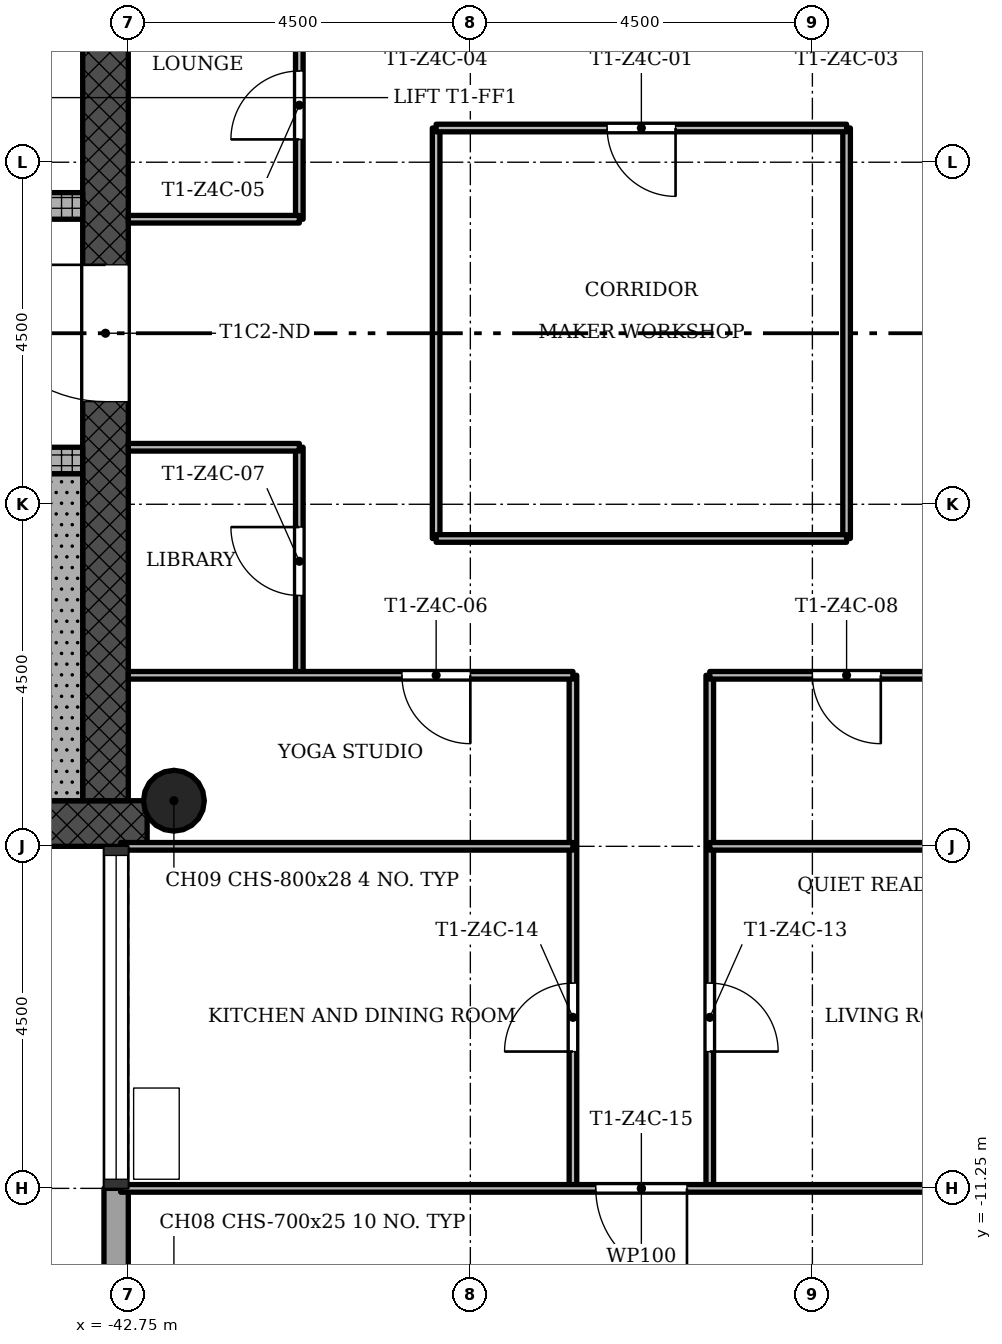
"""IFC4 building model, lengths in metres.
Left out: names, types, materials, properties, quantities, classifications, styles, units other than length and angle.
Written with IfcOpenShell. Run it as: python <this file> out.ifc"""

import sys

from ifc_helpers import new_model, si_unit, direction, frame, frame_2d, origin, origin_2d, place, context, subcontext, project, spatial, rectangle, hollow_circle, extrude, element, fill, save


model = new_model("IFC4")
c1 = context("Model", 3, precision=1e-05, world=origin(), true_north=direction((0.0, 1.0)))
c2 = subcontext(c1, "Body", "Model", "MODEL_VIEW")
j1 = project(units=[si_unit("LENGTHUNIT", "METRE"), si_unit("PLANEANGLEUNIT", "RADIAN")], contexts=[c1])
p1 = place(None, origin())
s1 = spatial("IfcSite", under=j1, at=p1, CompositionType="ELEMENT")
p2 = place(p1, origin())
s2 = spatial("IfcBuilding", under=s1, at=p2, CompositionType="ELEMENT")
p3 = place(p2, frame((0.0, 0.0, 185.8)))
s3 = spatial("IfcBuildingStorey", under=s2, at=p3, CompositionType="ELEMENT", Elevation=185.8)
p4 = place(p3, frame((-51.15, -6.45, 0.0), z_axis=(0.0, 0.0, 1.0), x_axis=(1.0, 0.0, 0.0)))
e1 = element("IfcWall", 1, at=p4, inside=s3, PredefinedType="SHEAR", context=c2, shape_type="SweptSolid", body=[
    extrude(rectangle(XDim=8.648, YDim=0.6, at=frame_2d((4.324, 0.0))), origin(), (0.0, 0.0, 1.0), 3.4),
])
p5 = place(p3, frame((-43.05, -6.15, 0.0), z_axis=(0.0, 0.0, 1.0), x_axis=(0.0, 1.0, 0.0)))
e2 = element("IfcWall", 2, at=p5, inside=s3, PredefinedType="SHEAR", context=c2, shape_type="SweptSolid", body=[
    extrude(rectangle(XDim=12.9, YDim=0.6, at=frame_2d((6.45, 0.0))), origin(), (0.0, 0.0, 1.0), 3.4),
])
p6 = place(p5, frame((5.25, 0.0, 0.0)))
e3 = element("IfcOpeningElement", 3, at=p6, cuts=e2, PredefinedType="OPENING", context=c2, shape_type="SweptSolid", body=[
    extrude(rectangle(XDim=1.8, YDim=2.1, at=frame_2d((0.9, 1.05))), frame((0.0, 0.31, 0.0), z_axis=(0.0, -1.0, 0.0), x_axis=(1.0, 0.0, 0.0)), (0.0, 0.0, 1.0), 0.62),
])
p7 = place(p3, frame((-51.15, -1.675, 0.0), z_axis=(0.0, 0.0, 1.0), x_axis=(1.0, 0.0, 0.0)))
e4 = element("IfcWall", 4, at=p7, inside=s3, PredefinedType="SHEAR", context=c2, shape_type="SweptSolid", body=[
    extrude(rectangle(XDim=7.8, YDim=0.35, at=frame_2d((3.9, 0.0))), origin(), (0.0, 0.0, 1.0), 3.4),
])
p8 = place(p7, frame((5.85, 0.0, 0.0)))
e5 = element("IfcOpeningElement", 5, at=p8, cuts=e4, PredefinedType="OPENING", context=c2, shape_type="SweptSolid", body=[
    extrude(rectangle(XDim=0.9, YDim=2.1, at=frame_2d((0.45, 1.05))), frame((0.0, 0.185, 0.0), z_axis=(0.0, -1.0, 0.0), x_axis=(1.0, 0.0, 0.0)), (0.0, 0.0, 1.0), 0.37),
])
p9 = place(p3, frame((-51.15, 1.675, 0.0), z_axis=(0.0, 0.0, 1.0), x_axis=(1.0, 0.0, 0.0)))
e6 = element("IfcWall", 6, at=p9, inside=s3, PredefinedType="SHEAR", context=c2, shape_type="SweptSolid", body=[
    extrude(rectangle(XDim=7.8, YDim=0.35, at=frame_2d((3.9, 0.0))), origin(), (0.0, 0.0, 1.0), 3.4),
])
p10 = place(p9, frame((5.55, 0.0, 0.0)))
e7 = element("IfcOpeningElement", 7, at=p10, cuts=e6, PredefinedType="OPENING", context=c2, shape_type="SweptSolid", body=[
    extrude(rectangle(XDim=1.1, YDim=2.1, at=frame_2d((0.55, 1.05))), frame((0.0, 0.185, 0.0), z_axis=(0.0, -1.0, 0.0), x_axis=(1.0, 0.0, 0.0)), (0.0, 0.0, 1.0), 0.37),
])
p11 = place(p9, frame((1.2, 0.0, 0.0)))
e8 = element("IfcOpeningElement", 8, at=p11, cuts=e6, PredefinedType="OPENING", context=c2, shape_type="SweptSolid", body=[
    extrude(rectangle(XDim=1.1, YDim=2.1, at=frame_2d((0.55, 1.05))), frame((0.0, 0.185, 0.0), z_axis=(0.0, -1.0, 0.0), x_axis=(1.0, 0.0, 0.0)), (0.0, 0.0, 1.0), 0.37),
])
p12 = place(p9, frame((3.5, 0.0, 0.0)))
e9 = element("IfcOpeningElement", 9, at=p12, cuts=e6, PredefinedType="OPENING", context=c2, shape_type="SweptSolid", body=[
    extrude(rectangle(XDim=0.9, YDim=2.1, at=frame_2d((0.45, 1.05))), frame((0.0, 0.185, 0.0), z_axis=(0.0, -1.0, 0.0), x_axis=(1.0, 0.0, 0.0)), (0.0, 0.0, 1.0), 0.37),
])
p13 = place(p3, frame((-42.15, -6.15, 0.0), z_axis=(0.0, 0.0, 1.0), x_axis=(1.0, 0.0, 0.0)))
e10 = element("IfcColumn", 10, at=p13, inside=s3, PredefinedType="COLUMN", context=c2, shape_type="SweptSolid", body=[
    extrude(hollow_circle(Radius=0.4, WallThickness=0.028, at=origin_2d()), origin(), (0.0, 0.0, 1.0), 3.4),
])
p14 = place(p3, frame((-42.91, -11.25, 0.0), z_axis=(0.0, 0.0, 1.0), x_axis=(0.0, -1.0, 0.0)))
e11 = element("IfcWall", 11, at=p14, inside=s3, PredefinedType="STANDARD", context=c2, shape_type="SweptSolid", body=[
    extrude(rectangle(XDim=1.82, YDim=0.32, at=frame_2d((0.91, 0.0))), origin(), (0.0, 0.0, 1.0), 3.1),
])
p15 = place(p3, frame((-40.5, -4.5, 0.0), z_axis=(0.0, 0.0, 1.0), x_axis=(0.0, 1.0, 0.0)))
e12 = element("IfcWall", 12, at=p15, inside=s3, PredefinedType="PARTITIONING", context=c2, shape_type="SweptSolid", body=[
    extrude(rectangle(XDim=3.0, YDim=0.1, at=frame_2d((1.5, 0.0))), origin(), (0.0, 0.0, 1.0), 3.0),
])
p16 = place(p15, frame((1.05, 0.0, 0.0)))
e13 = element("IfcOpeningElement", 13, at=p16, cuts=e12, PredefinedType="OPENING", context=c2, shape_type="SweptSolid", body=[
    extrude(rectangle(XDim=0.9, YDim=2.1, at=frame_2d((0.45, 1.05))), frame((0.0, 0.06, 0.0), z_axis=(0.0, -1.0, 0.0), x_axis=(1.0, 0.0, 0.0)), (0.0, 0.0, 1.0), 0.12),
])
p17 = place(p3, frame((-40.5, 1.5, 0.0), z_axis=(0.0, 0.0, 1.0), x_axis=(0.0, 1.0, 0.0)))
e14 = element("IfcWall", 14, at=p17, inside=s3, PredefinedType="PARTITIONING", context=c2, shape_type="SweptSolid", body=[
    extrude(rectangle(XDim=5.25, YDim=0.1, at=frame_2d((2.625, 0.0))), origin(), (0.0, 0.0, 1.0), 3.0),
])
p18 = place(p17, frame((1.05, 0.0, 0.0)))
e15 = element("IfcOpeningElement", 15, at=p18, cuts=e14, PredefinedType="OPENING", context=c2, shape_type="SweptSolid", body=[
    extrude(rectangle(XDim=0.9, YDim=2.1, at=frame_2d((0.45, 1.05))), frame((0.0, 0.06, 0.0), z_axis=(0.0, -1.0, 0.0), x_axis=(1.0, 0.0, 0.0)), (0.0, 0.0, 1.0), 0.12),
])
p19 = place(p3, frame((-38.7, -2.7, 0.0), z_axis=(0.0, 0.0, 1.0), x_axis=(0.0, 1.0, 0.0)))
e16 = element("IfcWall", 16, at=p19, inside=s3, PredefinedType="PARTITIONING", context=c2, shape_type="SweptSolid", body=[
    extrude(rectangle(XDim=5.4, YDim=0.1, at=frame_2d((2.7, 0.0))), origin(), (0.0, 0.0, 1.0), 3.0),
])
p20 = place(p3, frame((-36.9, -11.25, 0.0), z_axis=(0.0, 0.0, 1.0), x_axis=(0.0, 1.0, 0.0)))
e17 = element("IfcWall", 17, at=p20, inside=s3, PredefinedType="PARTITIONING", context=c2, shape_type="SweptSolid", body=[
    extrude(rectangle(XDim=6.75, YDim=0.1, at=frame_2d((3.375, 0.0))), origin(), (0.0, 0.0, 1.0), 3.0),
])
p21 = place(p20, frame((1.8, 0.0, 0.0)))
e18 = element("IfcOpeningElement", 18, at=p21, cuts=e17, PredefinedType="OPENING", context=c2, shape_type="SweptSolid", body=[
    extrude(rectangle(XDim=0.9, YDim=2.1, at=frame_2d((0.45, 1.05))), frame((0.0, 0.06, 0.0), z_axis=(0.0, -1.0, 0.0), x_axis=(1.0, 0.0, 0.0)), (0.0, 0.0, 1.0), 0.12),
])
p22 = place(p3, frame((-35.1, -11.25, 0.0), z_axis=(0.0, 0.0, 1.0), x_axis=(0.0, 1.0, 0.0)))
e19 = element("IfcWall", 19, at=p22, inside=s3, PredefinedType="PARTITIONING", context=c2, shape_type="SweptSolid", body=[
    extrude(rectangle(XDim=6.75, YDim=0.1, at=frame_2d((3.375, 0.0))), origin(), (0.0, 0.0, 1.0), 3.0),
])
p23 = place(p22, frame((1.8, 0.0, 0.0)))
e20 = element("IfcOpeningElement", 20, at=p23, cuts=e19, PredefinedType="OPENING", context=c2, shape_type="SweptSolid", body=[
    extrude(rectangle(XDim=0.9, YDim=2.1, at=frame_2d((0.45, 1.05))), frame((0.0, 0.06, 0.0), z_axis=(0.0, -1.0, 0.0), x_axis=(1.0, 0.0, 0.0)), (0.0, 0.0, 1.0), 0.12),
])
p24 = place(p3, frame((-33.3, -2.7, 0.0), z_axis=(0.0, 0.0, 1.0), x_axis=(0.0, 1.0, 0.0)))
e21 = element("IfcWall", 21, at=p24, inside=s3, PredefinedType="PARTITIONING", context=c2, shape_type="SweptSolid", body=[
    extrude(rectangle(XDim=5.4, YDim=0.1, at=frame_2d((2.7, 0.0))), origin(), (0.0, 0.0, 1.0), 3.0),
])
p25 = place(p3, frame((-42.85, -11.25, 0.0), z_axis=(0.0, 0.0, 1.0), x_axis=(1.0, 0.0, 0.0)))
e22 = element("IfcWall", 22, at=p25, inside=s3, PredefinedType="PARTITIONING", context=c2, shape_type="SweptSolid", body=[
    extrude(rectangle(XDim=13.7, YDim=0.1, at=frame_2d((6.85, 0.0))), origin(), (0.0, 0.0, 1.0), 3.0),
])
p26 = place(p25, frame((6.25, 0.0, 0.0)))
e23 = element("IfcOpeningElement", 23, at=p26, cuts=e22, PredefinedType="OPENING", context=c2, shape_type="SweptSolid", body=[
    extrude(rectangle(XDim=1.2, YDim=2.1, at=frame_2d((0.6, 1.05))), frame((0.0, 0.06, 0.0), z_axis=(0.0, -1.0, 0.0), x_axis=(1.0, 0.0, 0.0)), (0.0, 0.0, 1.0), 0.12),
])
for number, where, z_axis, x_axis in (
    (24, (-42.85, -6.75, 0.0), (0.0, 0.0, 1.0), (1.0, 0.0, 0.0)),
    (25, (-35.1, -6.75, 0.0), (0.0, 0.0, 1.0), (1.0, 0.0, 0.0)),
):
    element("IfcWall", number, at=place(p3, frame(where, z_axis=z_axis, x_axis=x_axis)), inside=s3, PredefinedType="PARTITIONING", context=c2, shape_type="SweptSolid", body=[
        extrude(rectangle(XDim=5.95, YDim=0.1, at=frame_2d((2.975, 0.0))), origin(), (0.0, 0.0, 1.0), 3.0),
    ])
p27 = place(p3, frame((-42.75, -4.5, 0.0), z_axis=(0.0, 0.0, 1.0), x_axis=(1.0, 0.0, 0.0)))
e26 = element("IfcWall", 26, at=p27, inside=s3, PredefinedType="PARTITIONING", context=c2, shape_type="SweptSolid", body=[
    extrude(rectangle(XDim=5.85, YDim=0.1, at=frame_2d((2.925, 0.0))), origin(), (0.0, 0.0, 1.0), 3.0),
])
p28 = place(p27, frame((3.6, 0.0, 0.0)))
e27 = element("IfcOpeningElement", 27, at=p28, cuts=e26, PredefinedType="OPENING", context=c2, shape_type="SweptSolid", body=[
    extrude(rectangle(XDim=0.9, YDim=2.1, at=frame_2d((0.45, 1.05))), frame((0.0, 0.06, 0.0), z_axis=(0.0, -1.0, 0.0), x_axis=(1.0, 0.0, 0.0)), (0.0, 0.0, 1.0), 0.12),
])
p29 = place(p3, frame((-35.1, -4.5, 0.0), z_axis=(0.0, 0.0, 1.0), x_axis=(1.0, 0.0, 0.0)))
e28 = element("IfcWall", 28, at=p29, inside=s3, PredefinedType="PARTITIONING", context=c2, shape_type="SweptSolid", body=[
    extrude(rectangle(XDim=3.6, YDim=0.1, at=frame_2d((1.8, 0.0))), origin(), (0.0, 0.0, 1.0), 3.0),
])
p30 = place(p29, frame((1.35, 0.0, 0.0)))
e29 = element("IfcOpeningElement", 29, at=p30, cuts=e28, PredefinedType="OPENING", context=c2, shape_type="SweptSolid", body=[
    extrude(rectangle(XDim=0.9, YDim=2.1, at=frame_2d((0.45, 1.05))), frame((0.0, 0.06, 0.0), z_axis=(0.0, -1.0, 0.0), x_axis=(1.0, 0.0, 0.0)), (0.0, 0.0, 1.0), 0.12),
])
p31 = place(p3, frame((-38.7, -2.7, 0.0), z_axis=(0.0, 0.0, 1.0), x_axis=(1.0, 0.0, 0.0)))
e30 = element("IfcWall", 30, at=p31, inside=s3, PredefinedType="PARTITIONING", context=c2, shape_type="SweptSolid", body=[
    extrude(rectangle(XDim=5.4, YDim=0.1, at=frame_2d((2.7, 0.0))), origin(), (0.0, 0.0, 1.0), 3.0),
])
for number, where, z_axis, x_axis in (
    (31, (-42.75, -1.5, 0.0), (0.0, 0.0, 1.0), (1.0, 0.0, 0.0)),
    (32, (-42.75, 1.5, 0.0), (0.0, 0.0, 1.0), (1.0, 0.0, 0.0)),
):
    element("IfcWall", number, at=place(p3, frame(where, z_axis=z_axis, x_axis=x_axis)), inside=s3, PredefinedType="PARTITIONING", context=c2, shape_type="SweptSolid", body=[
        extrude(rectangle(XDim=2.25, YDim=0.1, at=frame_2d((1.125, 0.0))), origin(), (0.0, 0.0, 1.0), 3.0),
    ])
p32 = place(p3, frame((-38.7, 2.7, 0.0), z_axis=(0.0, 0.0, 1.0), x_axis=(1.0, 0.0, 0.0)))
e33 = element("IfcWall", 33, at=p32, inside=s3, PredefinedType="PARTITIONING", context=c2, shape_type="SweptSolid", body=[
    extrude(rectangle(XDim=5.4, YDim=0.1, at=frame_2d((2.7, 0.0))), origin(), (0.0, 0.0, 1.0), 3.0),
])
p33 = place(p32, frame((2.25, 0.0, 0.0)))
e34 = element("IfcOpeningElement", 34, at=p33, cuts=e33, PredefinedType="OPENING", context=c2, shape_type="SweptSolid", body=[
    extrude(rectangle(XDim=0.9, YDim=2.1, at=frame_2d((0.45, 1.05))), frame((0.0, 0.06, 0.0), z_axis=(0.0, -1.0, 0.0), x_axis=(1.0, 0.0, 0.0)), (0.0, 0.0, 1.0), 0.12),
])
p34 = place(p3, frame((-43.65, -1.85, 0.0), z_axis=(0.0, 0.0, 1.0), x_axis=(0.0, -1.0, 0.0)))
e35 = element("IfcWall", 35, at=p34, inside=s3, PredefinedType="SHEAR", context=c2, shape_type="SweptSolid", body=[
    extrude(rectangle(XDim=4.3, YDim=0.6, at=frame_2d((2.15, 0.0))), origin(), (0.0, 0.0, 1.0), 3.4),
])
p35 = place(p33, origin())
e36 = element("IfcDoor", 36, at=p35, inside=s3, OperationType="SINGLE_SWING_RIGHT", PredefinedType="DOOR", context=c2, shape_type="SweptSolid", body=[
    extrude(rectangle(XDim=0.9, YDim=2.1, at=frame_2d((0.45, 1.05))), frame((0.0, 0.025, 0.0), z_axis=(0.0, -1.0, 0.0), x_axis=(1.0, 0.0, 0.0)), (0.0, 0.0, 1.0), 0.05),
])
fill(e34, e36)
p36 = place(p18, origin())
e37 = element("IfcDoor", 37, at=p36, inside=s3, OperationType="SINGLE_SWING_RIGHT", PredefinedType="DOOR", context=c2, shape_type="SweptSolid", body=[
    extrude(rectangle(XDim=0.9, YDim=2.1, at=frame_2d((0.45, 1.05))), frame((0.0, 0.025, 0.0), z_axis=(0.0, -1.0, 0.0), x_axis=(1.0, 0.0, 0.0)), (0.0, 0.0, 1.0), 0.05),
])
fill(e15, e37)
p37 = place(p28, origin())
e38 = element("IfcDoor", 38, at=p37, inside=s3, OperationType="SINGLE_SWING_RIGHT", PredefinedType="DOOR", context=c2, shape_type="SweptSolid", body=[
    extrude(rectangle(XDim=0.9, YDim=2.1, at=frame_2d((0.45, 1.05))), frame((0.0, 0.025, 0.0), z_axis=(0.0, -1.0, 0.0), x_axis=(1.0, 0.0, 0.0)), (0.0, 0.0, 1.0), 0.05),
])
fill(e27, e38)
p38 = place(p16, origin())
e39 = element("IfcDoor", 39, at=p38, inside=s3, OperationType="SINGLE_SWING_LEFT", PredefinedType="DOOR", context=c2, shape_type="SweptSolid", body=[
    extrude(rectangle(XDim=0.9, YDim=2.1, at=frame_2d((0.45, 1.05))), frame((0.0, 0.025, 0.0), z_axis=(0.0, -1.0, 0.0), x_axis=(1.0, 0.0, 0.0)), (0.0, 0.0, 1.0), 0.05),
])
fill(e13, e39)
p39 = place(p30, origin())
e40 = element("IfcDoor", 40, at=p39, inside=s3, OperationType="SINGLE_SWING_RIGHT", PredefinedType="DOOR", context=c2, shape_type="SweptSolid", body=[
    extrude(rectangle(XDim=0.9, YDim=2.1, at=frame_2d((0.45, 1.05))), frame((0.0, 0.025, 0.0), z_axis=(0.0, -1.0, 0.0), x_axis=(1.0, 0.0, 0.0)), (0.0, 0.0, 1.0), 0.05),
])
fill(e29, e40)
p40 = place(p23, origin())
e41 = element("IfcDoor", 41, at=p40, inside=s3, OperationType="SINGLE_SWING_LEFT", PredefinedType="DOOR", context=c2, shape_type="SweptSolid", body=[
    extrude(rectangle(XDim=0.9, YDim=2.1, at=frame_2d((0.45, 1.05))), frame((0.0, 0.025, 0.0), z_axis=(0.0, -1.0, 0.0), x_axis=(1.0, 0.0, 0.0)), (0.0, 0.0, 1.0), 0.05),
])
fill(e20, e41)
p41 = place(p21, origin())
e42 = element("IfcDoor", 42, at=p41, inside=s3, OperationType="SINGLE_SWING_RIGHT", PredefinedType="DOOR", context=c2, shape_type="SweptSolid", body=[
    extrude(rectangle(XDim=0.9, YDim=2.1, at=frame_2d((0.45, 1.05))), frame((0.0, 0.025, 0.0), z_axis=(0.0, -1.0, 0.0), x_axis=(1.0, 0.0, 0.0)), (0.0, 0.0, 1.0), 0.05),
])
fill(e18, e42)
p42 = place(p26, origin())
e43 = element("IfcDoor", 43, at=p42, inside=s3, OperationType="SINGLE_SWING_RIGHT", PredefinedType="DOOR", context=c2, shape_type="SweptSolid", body=[
    extrude(rectangle(XDim=1.2, YDim=2.1, at=frame_2d((0.6, 1.05))), frame((0.0, 0.025, 0.0), z_axis=(0.0, -1.0, 0.0), x_axis=(1.0, 0.0, 0.0)), (0.0, 0.0, 1.0), 0.05),
])
fill(e23, e43)
p43 = place(p6, origin())
e44 = element("IfcDoor", 44, at=p43, inside=s3, OperationType="SINGLE_SWING_LEFT", PredefinedType="DOOR", context=c2, shape_type="SweptSolid", body=[
    extrude(rectangle(XDim=1.8, YDim=2.1, at=frame_2d((0.9, 1.05))), frame((0.0, 0.025, 0.0), z_axis=(0.0, -1.0, 0.0), x_axis=(1.0, 0.0, 0.0)), (0.0, 0.0, 1.0), 0.05),
])
fill(e3, e44)
save(model, sys.argv[1])
